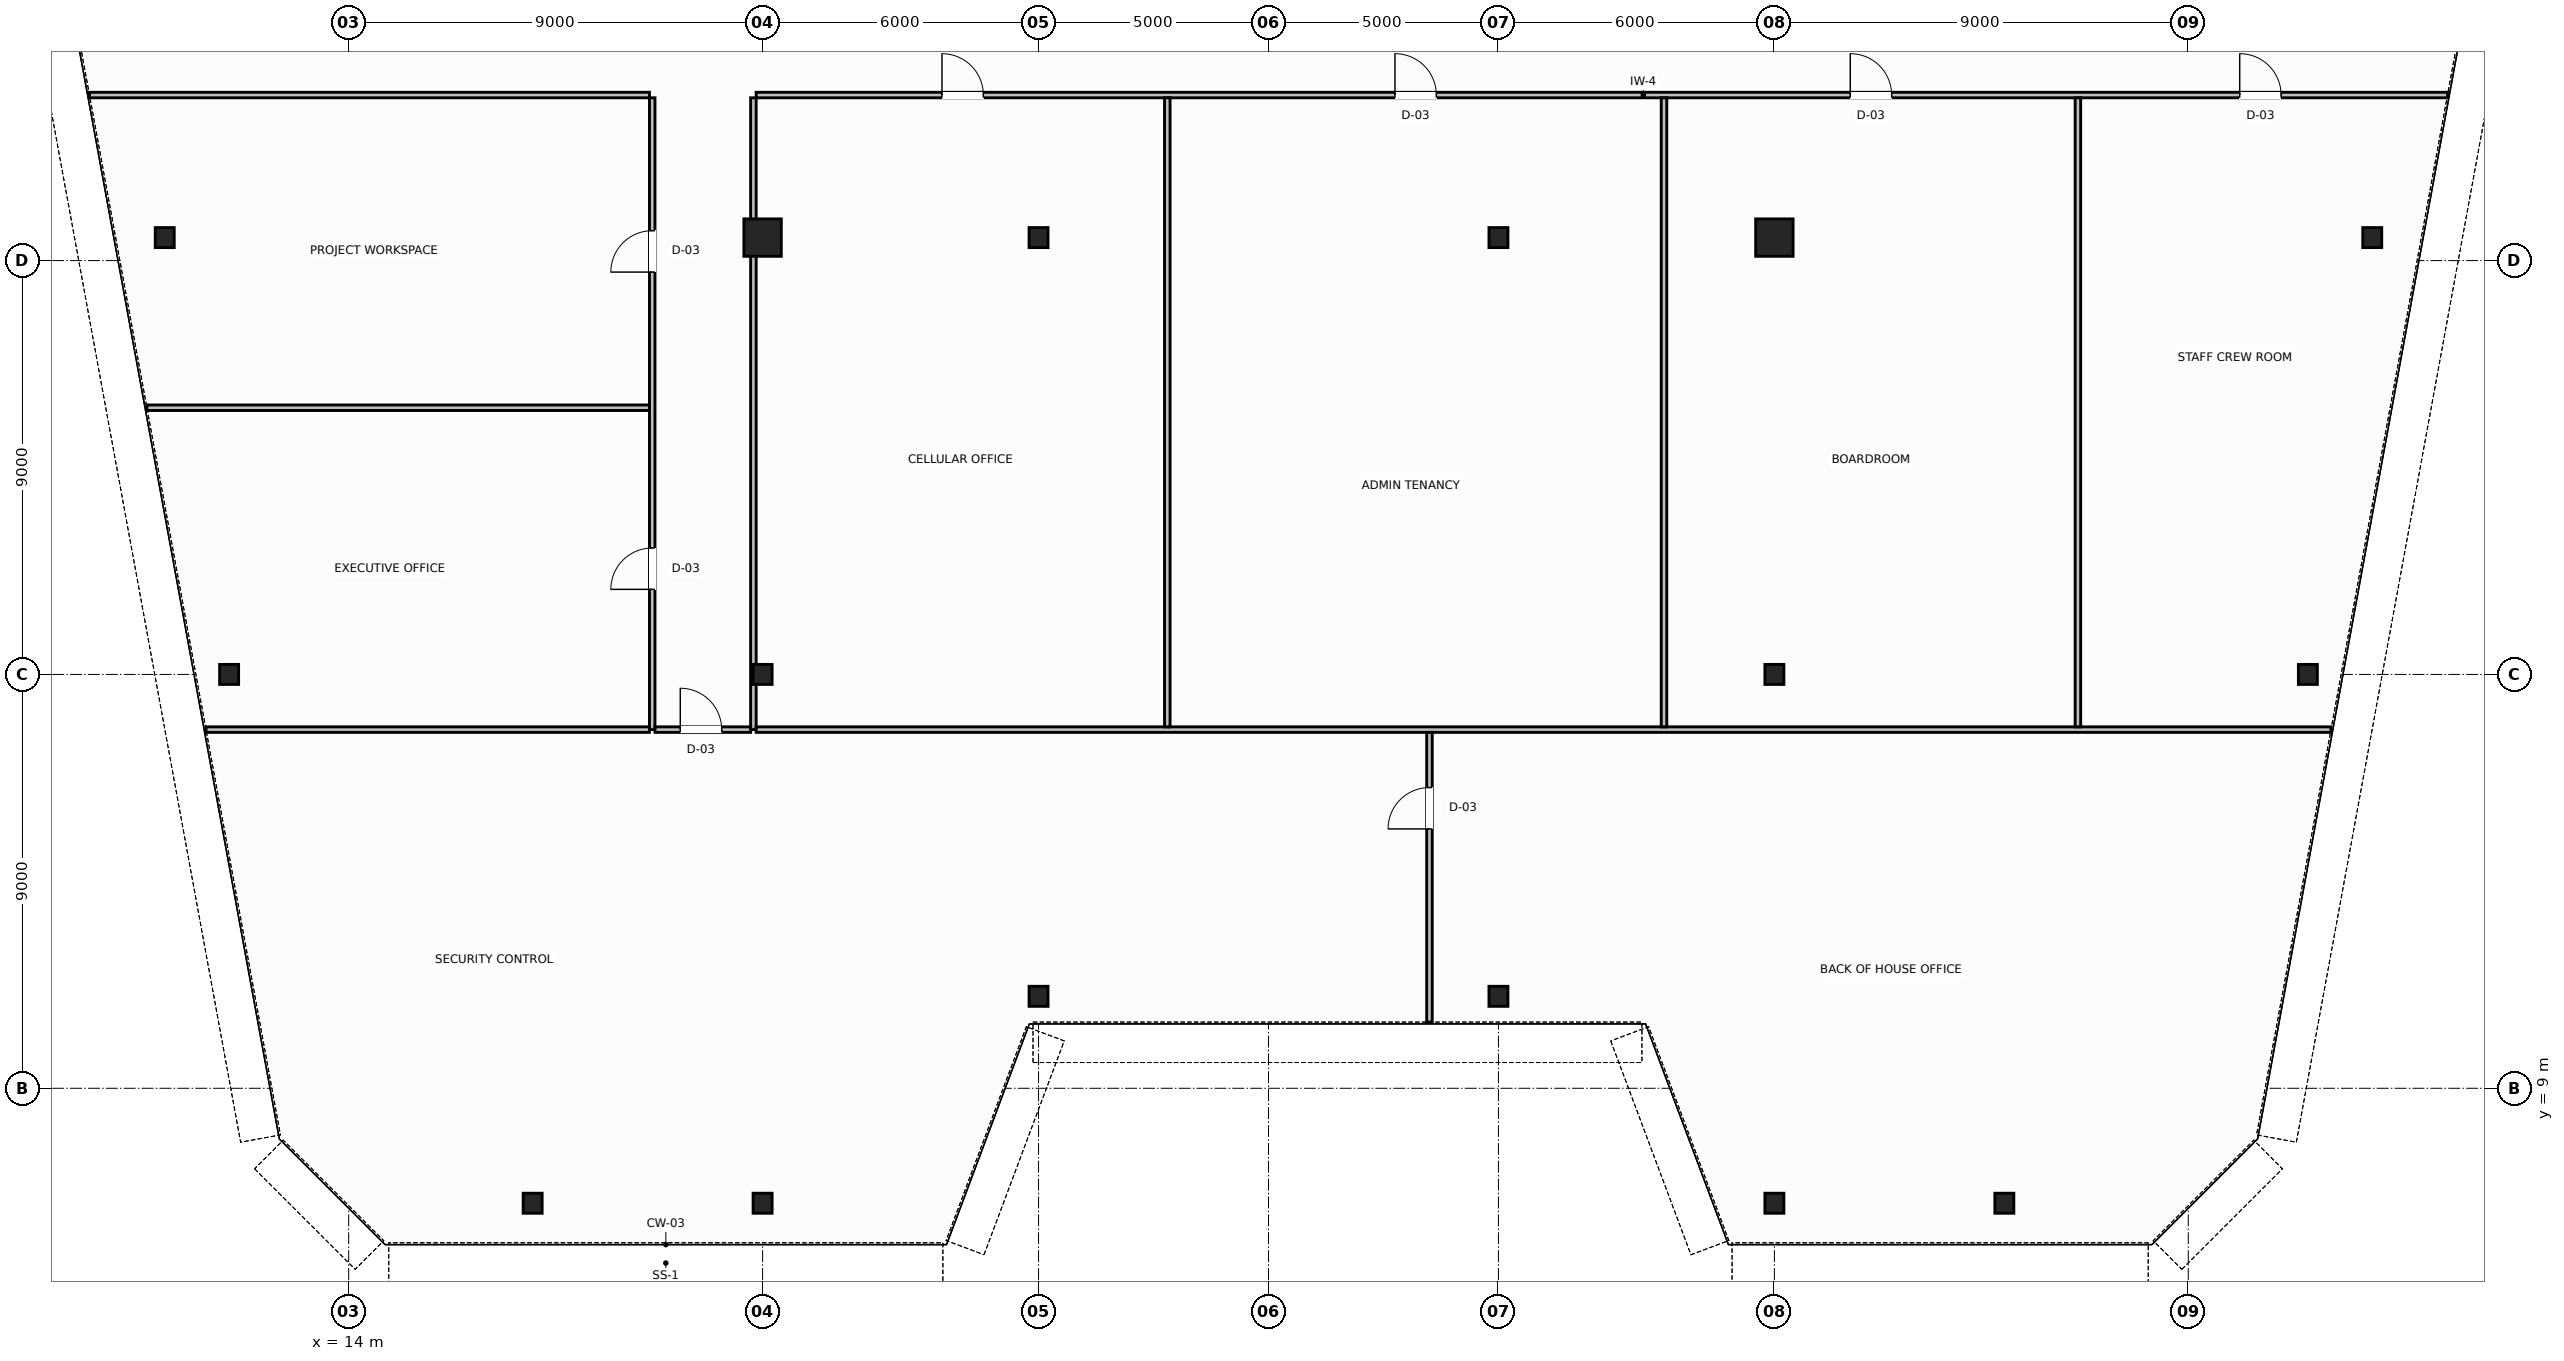
"""IFC4 building model, lengths in metres.
Left out: names, types, materials, properties, quantities, classifications, styles, units other than length and angle.
Written with IfcOpenShell. Run it as: python <this file> out.ifc"""

import sys

from ifc_helpers import new_model, si_unit, direction, frame, frame_2d, origin, origin_2d, place, context, subcontext, project, spatial, rectangle, hollow_circle, i_section, extrude, source, transform, mapped, element, fill, save


model = new_model("IFC4")
c1 = context("Model", 3, precision=1e-05, world=origin(), true_north=direction((0.0, 1.0)))
c2 = subcontext(c1, "Body", "Model", "MODEL_VIEW")
j1 = project(units=[si_unit("LENGTHUNIT", "METRE"), si_unit("PLANEANGLEUNIT", "RADIAN")], contexts=[c1])
p1 = place(None, origin())
s1 = spatial("IfcSite", under=j1, at=p1, CompositionType="ELEMENT")
p2 = place(p1, origin())
s2 = spatial("IfcBuilding", under=s1, at=p2, CompositionType="ELEMENT")
p3 = place(p2, frame((0.0, 0.0, 188.0)))
s3 = spatial("IfcBuildingStorey", under=s2, at=p3, CompositionType="ELEMENT", Elevation=188.0)
m1 = source(origin(), c2, "Body", "SweptSolid", [
    extrude(i_section(OverallWidth=0.412, OverallDepth=0.435, WebThickness=0.036, FlangeThickness=0.05, FilletRadius=0.015, at=origin_2d()), origin(), (0.0, 0.0, 1.0), 3.8),
])
for number, where, z_axis, x_axis in (
    (1, (10.0, 27.5, 0.0), (0.0, 0.0, 1.0), (1.0, 0.0, 0.0)),
    (2, (11.4, 18.0, 0.0), (0.0, 0.0, 1.0), (1.0, 0.0, 0.0)),
    (3, (58.0, 27.5, 0.0), (0.0, 0.0, 1.0), (1.0, 0.0, 0.0)),
    (4, (56.6, 18.0, 0.0), (0.0, 0.0, 1.0), (1.0, 0.0, 0.0)),
):
    element("IfcColumn", number, at=place(p3, frame(where, z_axis=z_axis, x_axis=x_axis)), inside=s3, PredefinedType="COLUMN", context=c2, shape_type="MappedRepresentation", body=[
        mapped(m1, transform((0.0, 0.0, 0.0), scale=1.0)),
    ])
m2 = source(origin(), c2, "Body", "SweptSolid", [
    extrude(hollow_circle(Radius=0.406, WallThickness=0.04, at=origin_2d()), origin(), (0.0, 0.0, 1.0), 3.8),
])
p4 = place(p3, frame((23.0, 27.5, 0.0), z_axis=(0.0, 0.0, 1.0), x_axis=(1.0, 0.0, 0.0)))
e5 = element("IfcColumn", 5, at=p4, inside=s3, PredefinedType="COLUMN", context=c2, shape_type="MappedRepresentation", body=[
    mapped(m2, transform((0.0, 0.0, 0.0), scale=1.0)),
])
m3 = source(origin(), c2, "Body", "SweptSolid", [
    extrude(i_section(OverallWidth=0.412, OverallDepth=0.435, WebThickness=0.036, FlangeThickness=0.05, FilletRadius=0.015, at=origin_2d()), origin(), (0.0, 0.0, 1.0), 3.8),
])
for number, where, z_axis, x_axis in (
    (6, (29.0, 27.5, 0.0), (0.0, 0.0, 1.0), (1.0, 0.0, 0.0)),
    (7, (39.0, 27.5, 0.0), (0.0, 0.0, 1.0), (1.0, 0.0, 0.0)),
):
    element("IfcColumn", number, at=place(p3, frame(where, z_axis=z_axis, x_axis=x_axis)), inside=s3, PredefinedType="COLUMN", context=c2, shape_type="MappedRepresentation", body=[
        mapped(m3, transform((0.0, 0.0, 0.0), scale=1.0)),
    ])
p5 = place(p3, frame((45.0, 27.5, 0.0), z_axis=(0.0, 0.0, 1.0), x_axis=(1.0, 0.0, 0.0)))
e8 = element("IfcColumn", 8, at=p5, inside=s3, PredefinedType="COLUMN", context=c2, shape_type="MappedRepresentation", body=[
    mapped(m2, transform((0.0, 0.0, 0.0), scale=1.0)),
])
for number, where, z_axis, x_axis in (
    (9, (23.0, 18.0, 0.0), (0.0, 0.0, 1.0), (1.0, 0.0, 0.0)),
    (10, (45.0, 18.0, 0.0), (0.0, 0.0, 1.0), (1.0, 0.0, 0.0)),
    (11, (18.0, 6.5, 0.0), (0.0, 0.0, 1.0), (1.0, 0.0, 0.0)),
    (12, (23.0, 6.5, 0.0), (0.0, 0.0, 1.0), (1.0, 0.0, 0.0)),
    (13, (29.0, 11.0, 0.0), (0.0, 0.0, 1.0), (1.0, 0.0, 0.0)),
    (14, (39.0, 11.0, 0.0), (0.0, 0.0, 1.0), (1.0, 0.0, 0.0)),
    (15, (45.0, 6.5, 0.0), (0.0, 0.0, 1.0), (1.0, 0.0, 0.0)),
    (16, (50.0, 6.5, 0.0), (0.0, 0.0, 1.0), (1.0, 0.0, 0.0)),
):
    element("IfcColumn", number, at=place(p3, frame(where, z_axis=z_axis, x_axis=x_axis)), inside=s3, PredefinedType="COLUMN", context=c2, shape_type="MappedRepresentation", body=[
        mapped(m3, transform((0.0, 0.0, 0.0), scale=1.0)),
    ])
p6 = place(p3, frame((8.363, 30.6, 0.0), z_axis=(0.0, 0.0, 1.0), x_axis=(1.0, 0.0, 0.0)))
e17 = element("IfcWall", 17, at=p6, inside=s3, PredefinedType="PARTITIONING", context=c2, shape_type="SweptSolid", body=[
    extrude(rectangle(XDim=12.177, YDim=0.12, at=frame_2d((6.088, 0.0))), origin(), (0.0, 0.0, 1.0), 3.58),
])
p7 = place(p3, frame((22.86, 30.6, 0.0), z_axis=(0.0, 0.0, 1.0), x_axis=(1.0, 0.0, 0.0)))
e18 = element("IfcWall", 18, at=p7, inside=s3, PredefinedType="PARTITIONING", context=c2, shape_type="SweptSolid", body=[
    extrude(rectangle(XDim=36.777, YDim=0.12, at=frame_2d((18.388, 0.0))), origin(), (0.0, 0.0, 1.0), 3.58),
])
p8 = place(p7, frame((4.04, 0.0, 0.0)))
e19 = element("IfcOpeningElement", 19, at=p8, cuts=e18, PredefinedType="OPENING", context=c2, shape_type="SweptSolid", body=[
    extrude(rectangle(XDim=0.9, YDim=2.15, at=frame_2d((0.45, 1.075))), frame((0.0, 0.07, 0.0), z_axis=(0.0, -1.0, 0.0), x_axis=(1.0, 0.0, 0.0)), (0.0, 0.0, 1.0), 0.14),
])
p9 = place(p7, frame((13.89, 0.0, 0.0)))
e20 = element("IfcOpeningElement", 20, at=p9, cuts=e18, PredefinedType="OPENING", context=c2, shape_type="SweptSolid", body=[
    extrude(rectangle(XDim=0.9, YDim=2.15, at=frame_2d((0.45, 1.075))), frame((0.0, 0.07, 0.0), z_axis=(0.0, -1.0, 0.0), x_axis=(1.0, 0.0, 0.0)), (0.0, 0.0, 1.0), 0.14),
])
p10 = place(p7, frame((23.79, 0.0, 0.0)))
e21 = element("IfcOpeningElement", 21, at=p10, cuts=e18, PredefinedType="OPENING", context=c2, shape_type="SweptSolid", body=[
    extrude(rectangle(XDim=0.9, YDim=2.15, at=frame_2d((0.45, 1.075))), frame((0.0, 0.07, 0.0), z_axis=(0.0, -1.0, 0.0), x_axis=(1.0, 0.0, 0.0)), (0.0, 0.0, 1.0), 0.14),
])
p11 = place(p7, frame((32.258, 0.0, 0.0)))
e22 = element("IfcOpeningElement", 22, at=p11, cuts=e18, PredefinedType="OPENING", context=c2, shape_type="SweptSolid", body=[
    extrude(rectangle(XDim=0.9, YDim=2.15, at=frame_2d((0.45, 1.075))), frame((0.0, 0.07, 0.0), z_axis=(0.0, -1.0, 0.0), x_axis=(1.0, 0.0, 0.0)), (0.0, 0.0, 1.0), 0.14),
])
p12 = place(p3, frame((20.6, 16.8, 0.0), z_axis=(0.0, 0.0, 1.0), x_axis=(0.0, 1.0, 0.0)))
e23 = element("IfcWall", 23, at=p12, inside=s3, PredefinedType="PARTITIONING", context=c2, shape_type="SweptSolid", body=[
    extrude(rectangle(XDim=13.74, YDim=0.12, at=frame_2d((6.87, 0.0))), origin(), (0.0, 0.0, 1.0), 3.58),
])
p13 = place(p12, frame((3.05, 0.0, 0.0)))
e24 = element("IfcOpeningElement", 24, at=p13, cuts=e23, PredefinedType="OPENING", context=c2, shape_type="SweptSolid", body=[
    extrude(rectangle(XDim=0.9, YDim=2.15, at=frame_2d((0.45, 1.075))), frame((0.0, 0.07, 0.0), z_axis=(0.0, -1.0, 0.0), x_axis=(1.0, 0.0, 0.0)), (0.0, 0.0, 1.0), 0.14),
])
p14 = place(p12, frame((9.95, 0.0, 0.0)))
e25 = element("IfcOpeningElement", 25, at=p14, cuts=e23, PredefinedType="OPENING", context=c2, shape_type="SweptSolid", body=[
    extrude(rectangle(XDim=0.9, YDim=2.15, at=frame_2d((0.45, 1.075))), frame((0.0, 0.07, 0.0), z_axis=(0.0, -1.0, 0.0), x_axis=(1.0, 0.0, 0.0)), (0.0, 0.0, 1.0), 0.14),
])
p15 = place(p3, frame((22.8, 16.8, 0.0), z_axis=(0.0, 0.0, 1.0), x_axis=(0.0, 1.0, 0.0)))
e26 = element("IfcWall", 26, at=p15, inside=s3, PredefinedType="PARTITIONING", context=c2, shape_type="SweptSolid", body=[
    extrude(rectangle(XDim=13.74, YDim=0.12, at=frame_2d((6.87, 0.0))), origin(), (0.0, 0.0, 1.0), 2.97),
])
p16 = place(p3, frame((20.66, 16.8, 0.0), z_axis=(0.0, 0.0, 1.0), x_axis=(1.0, 0.0, 0.0)))
e27 = element("IfcWall", 27, at=p16, inside=s3, PredefinedType="PARTITIONING", context=c2, shape_type="SweptSolid", body=[
    extrude(rectangle(XDim=2.08, YDim=0.12, at=frame_2d((1.04, 0.0))), origin(), (0.0, 0.0, 1.0), 3.58),
])
p17 = place(p16, frame((0.55, 0.0, 0.0)))
e28 = element("IfcOpeningElement", 28, at=p17, cuts=e27, PredefinedType="OPENING", context=c2, shape_type="SweptSolid", body=[
    extrude(rectangle(XDim=0.9, YDim=2.15, at=frame_2d((0.45, 1.075))), frame((0.0, 0.07, 0.0), z_axis=(0.0, -1.0, 0.0), x_axis=(1.0, 0.0, 0.0)), (0.0, 0.0, 1.0), 0.14),
])
p18 = place(p3, frame((10.897, 16.8, 0.0), z_axis=(0.0, 0.0, 1.0), x_axis=(1.0, 0.0, 0.0)))
e29 = element("IfcWall", 29, at=p18, inside=s3, PredefinedType="PARTITIONING", context=c2, shape_type="SweptSolid", body=[
    extrude(rectangle(XDim=9.643, YDim=0.12, at=frame_2d((4.822, 0.0))), origin(), (0.0, 0.0, 1.0), 3.58),
])
p19 = place(p3, frame((22.86, 16.8, 0.0), z_axis=(0.0, 0.0, 1.0), x_axis=(1.0, 0.0, 0.0)))
e30 = element("IfcWall", 30, at=p19, inside=s3, PredefinedType="PARTITIONING", context=c2, shape_type="SweptSolid", body=[
    extrude(rectangle(XDim=34.243, YDim=0.12, at=frame_2d((17.122, 0.0))), origin(), (0.0, 0.0, 1.0), 3.58),
])
p20 = place(p3, frame((37.5, 10.44, 0.0), z_axis=(0.0, 0.0, 1.0), x_axis=(0.0, 1.0, 0.0)))
e31 = element("IfcWall", 31, at=p20, inside=s3, PredefinedType="PARTITIONING", context=c2, shape_type="SweptSolid", body=[
    extrude(rectangle(XDim=6.3, YDim=0.12, at=frame_2d((3.15, 0.0))), origin(), (0.0, 0.0, 1.0), 3.58),
])
p21 = place(p20, frame((4.2, 0.0, 0.0)))
e32 = element("IfcOpeningElement", 32, at=p21, cuts=e31, PredefinedType="OPENING", context=c2, shape_type="SweptSolid", body=[
    extrude(rectangle(XDim=0.9, YDim=2.15, at=frame_2d((0.45, 1.075))), frame((0.0, 0.07, 0.0), z_axis=(0.0, -1.0, 0.0), x_axis=(1.0, 0.0, 0.0)), (0.0, 0.0, 1.0), 0.14),
])
p22 = place(p3, frame((9.612, 23.8, 0.0), z_axis=(0.0, 0.0, 1.0), x_axis=(1.0, 0.0, 0.0)))
e33 = element("IfcWall", 33, at=p22, inside=s3, PredefinedType="PARTITIONING", context=c2, shape_type="SweptSolid", body=[
    extrude(rectangle(XDim=10.928, YDim=0.12, at=frame_2d((5.464, 0.0))), origin(), (0.0, 0.0, 1.0), 3.58),
])
for number, where, z_axis, x_axis in (
    (34, (31.8, 16.86, 0.0), (0.0, 0.0, 1.0), (0.0, 1.0, 0.0)),
    (35, (42.6, 16.86, 0.0), (0.0, 0.0, 1.0), (0.0, 1.0, 0.0)),
    (36, (51.6, 16.86, 0.0), (0.0, 0.0, 1.0), (0.0, 1.0, 0.0)),
):
    element("IfcWall", number, at=place(p3, frame(where, z_axis=z_axis, x_axis=x_axis)), inside=s3, PredefinedType="PARTITIONING", context=c2, shape_type="SweptSolid", body=[
        extrude(rectangle(XDim=13.68, YDim=0.12, at=frame_2d((6.84, 0.0))), origin(), (0.0, 0.0, 1.0), 3.58),
    ])
m4 = source(origin(), c2, "Body", "SweptSolid", [
    extrude(rectangle(XDim=0.9, YDim=2.15, at=frame_2d((0.45, 1.075))), frame((0.0, 0.025, 0.0), z_axis=(0.0, -1.0, 0.0), x_axis=(1.0, 0.0, 0.0)), (0.0, 0.0, 1.0), 0.05),
])
p23 = place(p17, origin())
e37 = element("IfcDoor", 37, at=p23, inside=s3, OperationType="SINGLE_SWING_LEFT", PredefinedType="DOOR", context=c2, shape_type="MappedRepresentation", body=[
    mapped(m4, transform((0.0, 0.0, 0.0), scale=1.0)),
])
fill(e28, e37)
p24 = place(p21, origin())
e38 = element("IfcDoor", 38, at=p24, inside=s3, OperationType="SINGLE_SWING_RIGHT", PredefinedType="DOOR", context=c2, shape_type="MappedRepresentation", body=[
    mapped(m4, transform((0.0, 0.0, 0.0), scale=1.0)),
])
fill(e32, e38)
p25 = place(p13, origin())
e39 = element("IfcDoor", 39, at=p25, inside=s3, OperationType="SINGLE_SWING_LEFT", PredefinedType="DOOR", context=c2, shape_type="MappedRepresentation", body=[
    mapped(m4, transform((0.0, 0.0, 0.0), scale=1.0)),
])
fill(e24, e39)
p26 = place(p14, origin())
e40 = element("IfcDoor", 40, at=p26, inside=s3, OperationType="SINGLE_SWING_RIGHT", PredefinedType="DOOR", context=c2, shape_type="MappedRepresentation", body=[
    mapped(m4, transform((0.0, 0.0, 0.0), scale=1.0)),
])
fill(e25, e40)
p27 = place(p8, origin())
e41 = element("IfcDoor", 41, at=p27, inside=s3, OperationType="SINGLE_SWING_RIGHT", PredefinedType="DOOR", context=c2, shape_type="MappedRepresentation", body=[
    mapped(m4, transform((0.0, 0.0, 0.0), scale=1.0)),
])
fill(e19, e41)
p28 = place(p9, origin())
e42 = element("IfcDoor", 42, at=p28, inside=s3, OperationType="SINGLE_SWING_LEFT", PredefinedType="DOOR", context=c2, shape_type="MappedRepresentation", body=[
    mapped(m4, transform((0.0, 0.0, 0.0), scale=1.0)),
])
fill(e20, e42)
p29 = place(p10, origin())
e43 = element("IfcDoor", 43, at=p29, inside=s3, OperationType="SINGLE_SWING_RIGHT", PredefinedType="DOOR", context=c2, shape_type="MappedRepresentation", body=[
    mapped(m4, transform((0.0, 0.0, 0.0), scale=1.0)),
])
fill(e21, e43)
p30 = place(p11, origin())
e44 = element("IfcDoor", 44, at=p30, inside=s3, OperationType="SINGLE_SWING_LEFT", PredefinedType="DOOR", context=c2, shape_type="MappedRepresentation", body=[
    mapped(m4, transform((0.0, 0.0, 0.0), scale=1.0)),
])
fill(e22, e44)
save(model, sys.argv[1])
